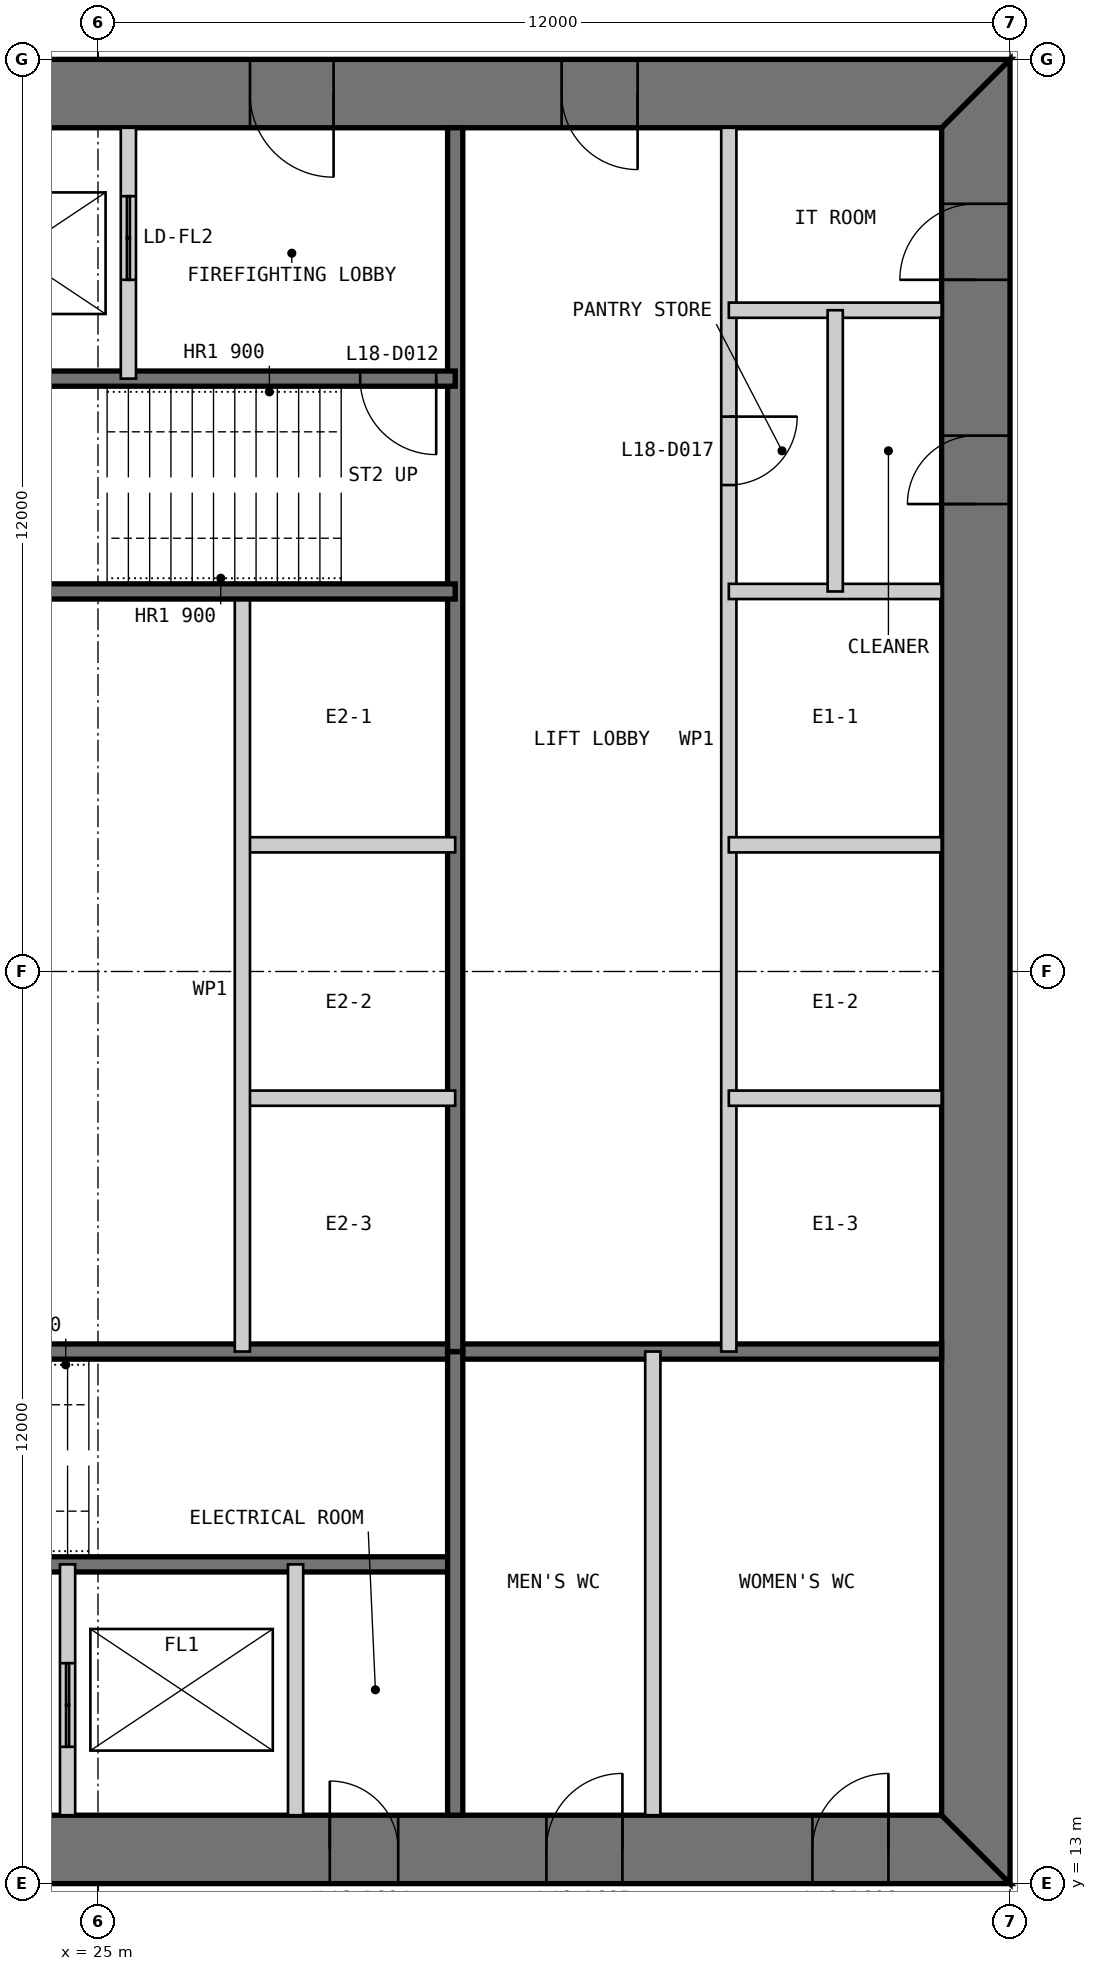
"""IFC4 building model, lengths in metres.
Left out: names, types, materials, properties, quantities, classifications, styles, units other than length and angle.
Written with IfcOpenShell. Run it as: python <this file> out.ifc"""

import sys

from ifc_helpers import new_model, si_unit, direction, frame, frame_2d, origin, place, context, subcontext, project, spatial, polyline, rectangle, outline, extrude, element, fill, save


model = new_model("IFC4")
c1 = context("Model", 3, precision=1e-05, world=origin(), true_north=direction((0.0, 1.0)))
c2 = subcontext(c1, "Body", "Model", "MODEL_VIEW")
j1 = project(units=[si_unit("LENGTHUNIT", "METRE"), si_unit("PLANEANGLEUNIT", "RADIAN")], contexts=[c1])
p1 = place(None, origin())
s1 = spatial("IfcSite", under=j1, at=p1, CompositionType="ELEMENT")
p2 = place(p1, origin())
s2 = spatial("IfcBuilding", under=s1, at=p2, CompositionType="ELEMENT")
p3 = place(p2, frame((0.0, 0.0, 79.0)))
s3 = spatial("IfcBuildingStorey", under=s2, at=p3, CompositionType="ELEMENT", Elevation=79.0)
p4 = place(p3, frame((13.0, 13.45, 0.0), z_axis=(0.0, 0.0, 1.0), x_axis=(1.0, 0.0, 0.0)))
e1 = element("IfcWall", 1, at=p4, inside=s3, PredefinedType="SHEAR", context=c2, shape_type="SweptSolid", body=[
    extrude(outline(polyline([(0.0, -0.45), (24.0, -0.45), (23.1, 0.45), (0.9, 0.45), (0.0, -0.45)])), origin(), (0.0, 0.0, 1.0), 4.0),
])
p5 = place(p4, frame((4.9, 0.0, 0.0)))
e2 = element("IfcOpeningElement", 2, at=p5, cuts=e1, PredefinedType="OPENING", context=c2, shape_type="SweptSolid", body=[
    extrude(rectangle(XDim=1.0, YDim=2.2, at=frame_2d((0.5, 1.1))), frame((0.0, 0.46, 0.0), z_axis=(0.0, -1.0, 0.0), x_axis=(1.0, 0.0, 0.0)), (0.0, 0.0, 1.0), 0.92),
])
p6 = place(p4, frame((8.9, 0.0, 0.0)))
e3 = element("IfcOpeningElement", 3, at=p6, cuts=e1, PredefinedType="OPENING", context=c2, shape_type="SweptSolid", body=[
    extrude(rectangle(XDim=1.1, YDim=2.2, at=frame_2d((0.55, 1.1))), frame((0.0, 0.46, 0.0), z_axis=(0.0, -1.0, 0.0), x_axis=(1.0, 0.0, 0.0)), (0.0, 0.0, 1.0), 0.92),
])
p7 = place(p4, frame((15.05, 0.0, 0.0)))
e4 = element("IfcOpeningElement", 4, at=p7, cuts=e1, PredefinedType="OPENING", context=c2, shape_type="SweptSolid", body=[
    extrude(rectangle(XDim=0.9, YDim=2.2, at=frame_2d((0.45, 1.1))), frame((0.0, 0.46, 0.0), z_axis=(0.0, -1.0, 0.0), x_axis=(1.0, 0.0, 0.0)), (0.0, 0.0, 1.0), 0.92),
])
p8 = place(p4, frame((17.9, 0.0, 0.0)))
e5 = element("IfcOpeningElement", 5, at=p8, cuts=e1, PredefinedType="OPENING", context=c2, shape_type="SweptSolid", body=[
    extrude(rectangle(XDim=1.0, YDim=2.2, at=frame_2d((0.5, 1.1))), frame((0.0, 0.46, 0.0), z_axis=(0.0, -1.0, 0.0), x_axis=(1.0, 0.0, 0.0)), (0.0, 0.0, 1.0), 0.92),
])
p9 = place(p4, frame((21.4, 0.0, 0.0)))
e6 = element("IfcOpeningElement", 6, at=p9, cuts=e1, PredefinedType="OPENING", context=c2, shape_type="SweptSolid", body=[
    extrude(rectangle(XDim=1.0, YDim=2.2, at=frame_2d((0.5, 1.1))), frame((0.0, 0.46, 0.0), z_axis=(0.0, -1.0, 0.0), x_axis=(1.0, 0.0, 0.0)), (0.0, 0.0, 1.0), 0.92),
])
p10 = place(p3, frame((36.55, 13.9, 0.0), z_axis=(0.0, 0.0, 1.0), x_axis=(0.0, 1.0, 0.0)))
e7 = element("IfcWall", 7, at=p10, inside=s3, PredefinedType="SHEAR", context=c2, shape_type="SweptSolid", body=[
    extrude(outline(polyline([(-0.9, -0.45), (23.1, -0.45), (22.2, 0.45), (0.0, 0.45), (-0.9, -0.45)])), origin(), (0.0, 0.0, 1.0), 4.0),
])
p11 = place(p10, frame((20.2, 0.0, 0.0)))
e8 = element("IfcOpeningElement", 8, at=p11, cuts=e7, PredefinedType="OPENING", context=c2, shape_type="SweptSolid", body=[
    extrude(rectangle(XDim=1.0, YDim=2.2, at=frame_2d((0.5, 1.1))), frame((0.0, 0.46, 0.0), z_axis=(0.0, -1.0, 0.0), x_axis=(1.0, 0.0, 0.0)), (0.0, 0.0, 1.0), 0.92),
])
p12 = place(p10, frame((17.25, 0.0, 0.0)))
e9 = element("IfcOpeningElement", 9, at=p12, cuts=e7, PredefinedType="OPENING", context=c2, shape_type="SweptSolid", body=[
    extrude(rectangle(XDim=0.9, YDim=2.2, at=frame_2d((0.45, 1.1))), frame((0.0, 0.46, 0.0), z_axis=(0.0, -1.0, 0.0), x_axis=(1.0, 0.0, 0.0)), (0.0, 0.0, 1.0), 0.92),
])
p13 = place(p3, frame((37.0, 36.55, 0.0), z_axis=(0.0, 0.0, 1.0), x_axis=(-1.0, 0.0, 0.0)))
e10 = element("IfcWall", 10, at=p13, inside=s3, PredefinedType="SHEAR", context=c2, shape_type="SweptSolid", body=[
    extrude(outline(polyline([(0.0, -0.45), (24.0, -0.45), (23.1, 0.45), (0.9, 0.45), (0.0, -0.45)])), origin(), (0.0, 0.0, 1.0), 4.0),
])
p14 = place(p13, frame((4.9, 0.0, 0.0)))
e11 = element("IfcOpeningElement", 11, at=p14, cuts=e10, PredefinedType="OPENING", context=c2, shape_type="SweptSolid", body=[
    extrude(rectangle(XDim=1.0, YDim=2.2, at=frame_2d((0.5, 1.1))), frame((0.0, 0.46, 0.0), z_axis=(0.0, -1.0, 0.0), x_axis=(1.0, 0.0, 0.0)), (0.0, 0.0, 1.0), 0.92),
])
p15 = place(p13, frame((8.9, 0.0, 0.0)))
e12 = element("IfcOpeningElement", 12, at=p15, cuts=e10, PredefinedType="OPENING", context=c2, shape_type="SweptSolid", body=[
    extrude(rectangle(XDim=1.1, YDim=2.2, at=frame_2d((0.55, 1.1))), frame((0.0, 0.46, 0.0), z_axis=(0.0, -1.0, 0.0), x_axis=(1.0, 0.0, 0.0)), (0.0, 0.0, 1.0), 0.92),
])
p16 = place(p13, frame((15.05, 0.0, 0.0)))
e13 = element("IfcOpeningElement", 13, at=p16, cuts=e10, PredefinedType="OPENING", context=c2, shape_type="SweptSolid", body=[
    extrude(rectangle(XDim=0.9, YDim=2.2, at=frame_2d((0.45, 1.1))), frame((0.0, 0.46, 0.0), z_axis=(0.0, -1.0, 0.0), x_axis=(1.0, 0.0, 0.0)), (0.0, 0.0, 1.0), 0.92),
])
p17 = place(p13, frame((17.9, 0.0, 0.0)))
e14 = element("IfcOpeningElement", 14, at=p17, cuts=e10, PredefinedType="OPENING", context=c2, shape_type="SweptSolid", body=[
    extrude(rectangle(XDim=1.0, YDim=2.2, at=frame_2d((0.5, 1.1))), frame((0.0, 0.46, 0.0), z_axis=(0.0, -1.0, 0.0), x_axis=(1.0, 0.0, 0.0)), (0.0, 0.0, 1.0), 0.92),
])
p18 = place(p13, frame((21.4, 0.0, 0.0)))
e15 = element("IfcOpeningElement", 15, at=p18, cuts=e10, PredefinedType="OPENING", context=c2, shape_type="SweptSolid", body=[
    extrude(rectangle(XDim=1.0, YDim=2.2, at=frame_2d((0.5, 1.1))), frame((0.0, 0.46, 0.0), z_axis=(0.0, -1.0, 0.0), x_axis=(1.0, 0.0, 0.0)), (0.0, 0.0, 1.0), 0.92),
])
p19 = place(p3, frame((20.3, 17.2, 0.0), z_axis=(0.0, 0.0, 1.0), x_axis=(1.0, 0.0, 0.0)))
e16 = element("IfcWall", 16, at=p19, inside=s3, PredefinedType="SOLIDWALL", context=c2, shape_type="SweptSolid", body=[
    extrude(rectangle(XDim=9.4, YDim=0.2, at=frame_2d((4.7, 0.0))), origin(), (0.0, 0.0, 1.0), 3.8),
])
p20 = place(p19, frame((0.25, 0.0, 0.0)))
e17 = element("IfcOpeningElement", 17, at=p20, cuts=e16, PredefinedType="OPENING", context=c2, shape_type="SweptSolid", body=[
    extrude(rectangle(XDim=1.0, YDim=2.2, at=frame_2d((0.5, 1.1))), frame((0.0, 0.11, 0.0), z_axis=(0.0, -1.0, 0.0), x_axis=(1.0, 0.0, 0.0)), (0.0, 0.0, 1.0), 0.22),
])
p21 = place(p3, frame((20.3, 20.0, 0.0), z_axis=(0.0, 0.0, 1.0), x_axis=(1.0, 0.0, 0.0)))
e18 = element("IfcWall", 18, at=p21, inside=s3, PredefinedType="SOLIDWALL", context=c2, shape_type="SweptSolid", body=[
    extrude(rectangle(XDim=15.8, YDim=0.2, at=frame_2d((7.9, 0.0))), origin(), (0.0, 0.0, 1.0), 3.8),
])
p22 = place(p3, frame((24.6, 13.9, 0.0), z_axis=(0.0, 0.0, 1.0), x_axis=(0.0, 1.0, 0.0)))
e19 = element("IfcWall", 19, at=p22, inside=s3, PredefinedType="PARTITIONING", context=c2, shape_type="SweptSolid", body=[
    extrude(rectangle(XDim=3.3, YDim=0.2, at=frame_2d((1.65, 0.0))), origin(), (0.0, 0.0, 1.0), 3.8),
])
p23 = place(p22, frame((0.9, 0.0, 0.0)))
e20 = element("IfcOpeningElement", 20, at=p23, cuts=e19, PredefinedType="OPENING", context=c2, shape_type="SweptSolid", body=[
    extrude(rectangle(XDim=1.1, YDim=2.2, at=frame_2d((0.55, 1.1))), frame((0.0, 0.11, 0.0), z_axis=(0.0, -1.0, 0.0), x_axis=(1.0, 0.0, 0.0)), (0.0, 0.0, 1.0), 0.22),
])
p24 = place(p3, frame((27.6, 13.9, 0.0), z_axis=(0.0, 0.0, 1.0), x_axis=(0.0, 1.0, 0.0)))
e21 = element("IfcWall", 21, at=p24, inside=s3, PredefinedType="PARTITIONING", context=c2, shape_type="SweptSolid", body=[
    extrude(rectangle(XDim=3.3, YDim=0.2, at=frame_2d((1.65, 0.0))), origin(), (0.0, 0.0, 1.0), 3.8),
])
p25 = place(p3, frame((29.7, 13.9, 0.0), z_axis=(0.0, 0.0, 1.0), x_axis=(0.0, 1.0, 0.0)))
e22 = element("IfcWall", 22, at=p25, inside=s3, PredefinedType="SOLIDWALL", context=c2, shape_type="SweptSolid", body=[
    extrude(rectangle(XDim=6.1, YDim=0.2, at=frame_2d((3.05, 0.0))), origin(), (0.0, 0.0, 1.0), 3.8),
])
p26 = place(p3, frame((32.3, 13.9, 0.0), z_axis=(0.0, 0.0, 1.0), x_axis=(0.0, 1.0, 0.0)))
e23 = element("IfcWall", 23, at=p26, inside=s3, PredefinedType="PARTITIONING", context=c2, shape_type="SweptSolid", body=[
    extrude(rectangle(XDim=6.1, YDim=0.2, at=frame_2d((3.05, 0.0))), origin(), (0.0, 0.0, 1.0), 3.8),
])
p27 = place(p3, frame((33.3, 36.1, 0.0), z_axis=(0.0, 0.0, 1.0), x_axis=(0.0, -1.0, 0.0)))
e24 = element("IfcWall", 24, at=p27, inside=s3, PredefinedType="PARTITIONING", context=c2, shape_type="SweptSolid", body=[
    extrude(rectangle(XDim=16.1, YDim=0.2, at=frame_2d((8.05, 0.0))), origin(), (0.0, 0.0, 1.0), 3.8),
])
p28 = place(p27, frame((3.8, 0.0, 0.0)))
e25 = element("IfcOpeningElement", 25, at=p28, cuts=e24, PredefinedType="OPENING", context=c2, shape_type="SweptSolid", body=[
    extrude(rectangle(XDim=0.9, YDim=2.2, at=frame_2d((0.45, 1.1))), frame((0.0, 0.11, 0.0), z_axis=(0.0, -1.0, 0.0), x_axis=(1.0, 0.0, 0.0)), (0.0, 0.0, 1.0), 0.22),
])
p29 = place(p3, frame((29.7, 36.1, 0.0), z_axis=(0.0, 0.0, 1.0), x_axis=(0.0, -1.0, 0.0)))
e26 = element("IfcWall", 26, at=p29, inside=s3, PredefinedType="SOLIDWALL", context=c2, shape_type="SweptSolid", body=[
    extrude(rectangle(XDim=16.1, YDim=0.2, at=frame_2d((8.05, 0.0))), origin(), (0.0, 0.0, 1.0), 3.8),
])
for number, where, z_axis, x_axis in (
    (27, (36.1, 30.0, 0.0), (0.0, 0.0, 1.0), (-1.0, 0.0, 0.0)),
    (28, (36.1, 26.667, 0.0), (0.0, 0.0, 1.0), (-1.0, 0.0, 0.0)),
    (29, (36.1, 23.333, 0.0), (0.0, 0.0, 1.0), (-1.0, 0.0, 0.0)),
    (30, (29.7, 26.667, 0.0), (0.0, 0.0, 1.0), (-1.0, 0.0, 0.0)),
    (31, (29.7, 23.333, 0.0), (0.0, 0.0, 1.0), (-1.0, 0.0, 0.0)),
):
    element("IfcWall", number, at=place(p3, frame(where, z_axis=z_axis, x_axis=x_axis)), inside=s3, PredefinedType="PARTITIONING", context=c2, shape_type="SweptSolid", body=[
        extrude(rectangle(XDim=2.8, YDim=0.2, at=frame_2d((1.4, 0.0))), origin(), (0.0, 0.0, 1.0), 3.8),
    ])
p30 = place(p3, frame((26.9, 30.0, 0.0), z_axis=(0.0, 0.0, 1.0), x_axis=(0.0, -1.0, 0.0)))
e32 = element("IfcWall", 32, at=p30, inside=s3, PredefinedType="PARTITIONING", context=c2, shape_type="SweptSolid", body=[
    extrude(rectangle(XDim=10.0, YDim=0.2, at=frame_2d((5.0, 0.0))), origin(), (0.0, 0.0, 1.0), 3.8),
])
p31 = place(p3, frame((29.7, 32.8, 0.0), z_axis=(0.0, 0.0, 1.0), x_axis=(-1.0, 0.0, 0.0)))
e33 = element("IfcWall", 33, at=p31, inside=s3, PredefinedType="SOLIDWALL", context=c2, shape_type="SweptSolid", body=[
    extrude(rectangle(XDim=9.4, YDim=0.2, at=frame_2d((4.7, 0.0))), origin(), (0.0, 0.0, 1.0), 3.8),
])
p32 = place(p31, frame((0.25, 0.0, 0.0)))
e34 = element("IfcOpeningElement", 34, at=p32, cuts=e33, PredefinedType="OPENING", context=c2, shape_type="SweptSolid", body=[
    extrude(rectangle(XDim=1.0, YDim=2.2, at=frame_2d((0.5, 1.1))), frame((0.0, 0.11, 0.0), z_axis=(0.0, -1.0, 0.0), x_axis=(1.0, 0.0, 0.0)), (0.0, 0.0, 1.0), 0.22),
])
p33 = place(p3, frame((29.7, 30.0, 0.0), z_axis=(0.0, 0.0, 1.0), x_axis=(-1.0, 0.0, 0.0)))
e35 = element("IfcWall", 35, at=p33, inside=s3, PredefinedType="SOLIDWALL", context=c2, shape_type="SweptSolid", body=[
    extrude(rectangle(XDim=15.8, YDim=0.2, at=frame_2d((7.9, 0.0))), origin(), (0.0, 0.0, 1.0), 3.8),
])
p34 = place(p3, frame((25.4, 36.1, 0.0), z_axis=(0.0, 0.0, 1.0), x_axis=(0.0, -1.0, 0.0)))
e36 = element("IfcWall", 36, at=p34, inside=s3, PredefinedType="PARTITIONING", context=c2, shape_type="SweptSolid", body=[
    extrude(rectangle(XDim=3.3, YDim=0.2, at=frame_2d((1.65, 0.0))), origin(), (0.0, 0.0, 1.0), 3.8),
])
p35 = place(p34, frame((0.9, 0.0, 0.0)))
e37 = element("IfcOpeningElement", 37, at=p35, cuts=e36, PredefinedType="OPENING", context=c2, shape_type="SweptSolid", body=[
    extrude(rectangle(XDim=1.1, YDim=2.2, at=frame_2d((0.55, 1.1))), frame((0.0, 0.11, 0.0), z_axis=(0.0, -1.0, 0.0), x_axis=(1.0, 0.0, 0.0)), (0.0, 0.0, 1.0), 0.22),
])
p36 = place(p3, frame((36.1, 33.7, 0.0), z_axis=(0.0, 0.0, 1.0), x_axis=(-1.0, 0.0, 0.0)))
e38 = element("IfcWall", 38, at=p36, inside=s3, PredefinedType="PARTITIONING", context=c2, shape_type="SweptSolid", body=[
    extrude(rectangle(XDim=2.8, YDim=0.2, at=frame_2d((1.4, 0.0))), origin(), (0.0, 0.0, 1.0), 3.8),
])
p37 = place(p3, frame((34.7, 33.7, 0.0), z_axis=(0.0, 0.0, 1.0), x_axis=(0.0, -1.0, 0.0)))
e39 = element("IfcWall", 39, at=p37, inside=s3, PredefinedType="PARTITIONING", context=c2, shape_type="SweptSolid", body=[
    extrude(rectangle(XDim=3.7, YDim=0.2, at=frame_2d((1.85, 0.0))), origin(), (0.0, 0.0, 1.0), 3.8),
])
p38 = place(p7, origin())
e40 = element("IfcDoor", 40, at=p38, inside=s3, OperationType="SINGLE_SWING_LEFT", PredefinedType="DOOR", context=c2, shape_type="SweptSolid", body=[
    extrude(rectangle(XDim=0.9, YDim=2.2, at=frame_2d((0.45, 1.1))), frame((0.0, 0.025, 0.0), z_axis=(0.0, -1.0, 0.0), x_axis=(1.0, 0.0, 0.0)), (0.0, 0.0, 1.0), 0.05),
    extrude(outline(polyline([(0.0, 0.0), (0.04, 0.0), (0.04, 2.16), (0.86, 2.16), (0.86, 0.0), (0.9, 0.0), (0.9, 2.2), (0.0, 2.2), (0.0, 0.0)])), frame((0.0, 0.3, 0.0), z_axis=(0.0, -1.0, 0.0), x_axis=(1.0, 0.0, 0.0)), (0.0, 0.0, 1.0), 0.6),
])
fill(e4, e40)
p39 = place(p8, origin())
e41 = element("IfcDoor", 41, at=p39, inside=s3, OperationType="SINGLE_SWING_RIGHT", PredefinedType="DOOR", context=c2, shape_type="SweptSolid", body=[
    extrude(rectangle(XDim=1.0, YDim=2.2, at=frame_2d((0.5, 1.1))), frame((0.0, 0.025, 0.0), z_axis=(0.0, -1.0, 0.0), x_axis=(1.0, 0.0, 0.0)), (0.0, 0.0, 1.0), 0.05),
    extrude(outline(polyline([(0.0, 0.0), (0.04, 0.0), (0.04, 2.16), (0.96, 2.16), (0.96, 0.0), (1.0, 0.0), (1.0, 2.2), (0.0, 2.2), (0.0, 0.0)])), frame((0.0, 0.3, 0.0), z_axis=(0.0, -1.0, 0.0), x_axis=(1.0, 0.0, 0.0)), (0.0, 0.0, 1.0), 0.6),
])
fill(e5, e41)
p40 = place(p9, origin())
e42 = element("IfcDoor", 42, at=p40, inside=s3, OperationType="SINGLE_SWING_RIGHT", PredefinedType="DOOR", context=c2, shape_type="SweptSolid", body=[
    extrude(rectangle(XDim=1.0, YDim=2.2, at=frame_2d((0.5, 1.1))), frame((0.0, 0.025, 0.0), z_axis=(0.0, -1.0, 0.0), x_axis=(1.0, 0.0, 0.0)), (0.0, 0.0, 1.0), 0.05),
    extrude(outline(polyline([(0.0, 0.0), (0.04, 0.0), (0.04, 2.16), (0.96, 2.16), (0.96, 0.0), (1.0, 0.0), (1.0, 2.2), (0.0, 2.2), (0.0, 0.0)])), frame((0.0, 0.3, 0.0), z_axis=(0.0, -1.0, 0.0), x_axis=(1.0, 0.0, 0.0)), (0.0, 0.0, 1.0), 0.6),
])
fill(e6, e42)
p41 = place(p14, origin())
e43 = element("IfcDoor", 43, at=p41, inside=s3, OperationType="SINGLE_SWING_LEFT", PredefinedType="DOOR", context=c2, shape_type="SweptSolid", body=[
    extrude(rectangle(XDim=1.0, YDim=2.2, at=frame_2d((0.5, 1.1))), frame((0.0, 0.025, 0.0), z_axis=(0.0, -1.0, 0.0), x_axis=(1.0, 0.0, 0.0)), (0.0, 0.0, 1.0), 0.05),
    extrude(outline(polyline([(0.0, 0.0), (0.04, 0.0), (0.04, 2.16), (0.96, 2.16), (0.96, 0.0), (1.0, 0.0), (1.0, 2.2), (0.0, 2.2), (0.0, 0.0)])), frame((0.0, 0.3, 0.0), z_axis=(0.0, -1.0, 0.0), x_axis=(1.0, 0.0, 0.0)), (0.0, 0.0, 1.0), 0.6),
])
fill(e11, e43)
p42 = place(p15, origin())
e44 = element("IfcDoor", 44, at=p42, inside=s3, OperationType="SINGLE_SWING_LEFT", PredefinedType="DOOR", context=c2, shape_type="SweptSolid", body=[
    extrude(rectangle(XDim=1.1, YDim=2.2, at=frame_2d((0.55, 1.1))), frame((0.0, 0.025, 0.0), z_axis=(0.0, -1.0, 0.0), x_axis=(1.0, 0.0, 0.0)), (0.0, 0.0, 1.0), 0.05),
    extrude(outline(polyline([(0.0, 0.0), (0.04, 0.0), (0.04, 2.16), (1.06, 2.16), (1.06, 0.0), (1.1, 0.0), (1.1, 2.2), (0.0, 2.2), (0.0, 0.0)])), frame((0.0, 0.3, 0.0), z_axis=(0.0, -1.0, 0.0), x_axis=(1.0, 0.0, 0.0)), (0.0, 0.0, 1.0), 0.6),
])
fill(e12, e44)
p43 = place(p32, origin())
e45 = element("IfcDoor", 45, at=p43, inside=s3, OperationType="SINGLE_SWING_LEFT", PredefinedType="DOOR", context=c2, shape_type="SweptSolid", body=[
    extrude(rectangle(XDim=1.0, YDim=2.2, at=frame_2d((0.5, 1.1))), frame((0.0, 0.025, 0.0), z_axis=(0.0, -1.0, 0.0), x_axis=(1.0, 0.0, 0.0)), (0.0, 0.0, 1.0), 0.05),
])
fill(e34, e45)
p44 = place(p11, origin())
e46 = element("IfcDoor", 46, at=p44, inside=s3, OperationType="SINGLE_SWING_LEFT", PredefinedType="DOOR", context=c2, shape_type="SweptSolid", body=[
    extrude(rectangle(XDim=1.0, YDim=2.2, at=frame_2d((0.5, 1.1))), frame((0.0, 0.025, 0.0), z_axis=(0.0, -1.0, 0.0), x_axis=(1.0, 0.0, 0.0)), (0.0, 0.0, 1.0), 0.05),
    extrude(outline(polyline([(0.0, 0.0), (0.04, 0.0), (0.04, 2.16), (0.96, 2.16), (0.96, 0.0), (1.0, 0.0), (1.0, 2.2), (0.0, 2.2), (0.0, 0.0)])), frame((0.0, 0.3, 0.0), z_axis=(0.0, -1.0, 0.0), x_axis=(1.0, 0.0, 0.0)), (0.0, 0.0, 1.0), 0.6),
])
fill(e8, e46)
p45 = place(p28, origin())
e47 = element("IfcDoor", 47, at=p45, inside=s3, OperationType="SINGLE_SWING_LEFT", PredefinedType="DOOR", context=c2, shape_type="SweptSolid", body=[
    extrude(rectangle(XDim=0.9, YDim=2.2, at=frame_2d((0.45, 1.1))), frame((0.0, 0.025, 0.0), z_axis=(0.0, -1.0, 0.0), x_axis=(1.0, 0.0, 0.0)), (0.0, 0.0, 1.0), 0.05),
])
fill(e25, e47)
p46 = place(p12, origin())
e48 = element("IfcDoor", 48, at=p46, inside=s3, OperationType="SINGLE_SWING_LEFT", PredefinedType="DOOR", context=c2, shape_type="SweptSolid", body=[
    extrude(rectangle(XDim=0.9, YDim=2.2, at=frame_2d((0.45, 1.1))), frame((0.0, 0.025, 0.0), z_axis=(0.0, -1.0, 0.0), x_axis=(1.0, 0.0, 0.0)), (0.0, 0.0, 1.0), 0.05),
    extrude(outline(polyline([(0.0, 0.0), (0.04, 0.0), (0.04, 2.16), (0.86, 2.16), (0.86, 0.0), (0.9, 0.0), (0.9, 2.2), (0.0, 2.2), (0.0, 0.0)])), frame((0.0, 0.3, 0.0), z_axis=(0.0, -1.0, 0.0), x_axis=(1.0, 0.0, 0.0)), (0.0, 0.0, 1.0), 0.6),
])
fill(e9, e48)
p47 = place(p23, origin())
e49 = element("IfcDoor", 49, at=p47, inside=s3, OperationType="DOUBLE_DOOR_SLIDING", PredefinedType="DOOR", context=c2, shape_type="SweptSolid", body=[
    extrude(rectangle(XDim=1.1, YDim=2.2, at=frame_2d((0.55, 1.1))), frame((0.0, 0.025, 0.0), z_axis=(0.0, -1.0, 0.0), x_axis=(1.0, 0.0, 0.0)), (0.0, 0.0, 1.0), 0.05),
])
fill(e20, e49)
p48 = place(p35, origin())
e50 = element("IfcDoor", 50, at=p48, inside=s3, OperationType="DOUBLE_DOOR_SLIDING", PredefinedType="DOOR", context=c2, shape_type="SweptSolid", body=[
    extrude(rectangle(XDim=1.1, YDim=2.2, at=frame_2d((0.55, 1.1))), frame((0.0, 0.025, 0.0), z_axis=(0.0, -1.0, 0.0), x_axis=(1.0, 0.0, 0.0)), (0.0, 0.0, 1.0), 0.05),
])
fill(e37, e50)
save(model, sys.argv[1])
